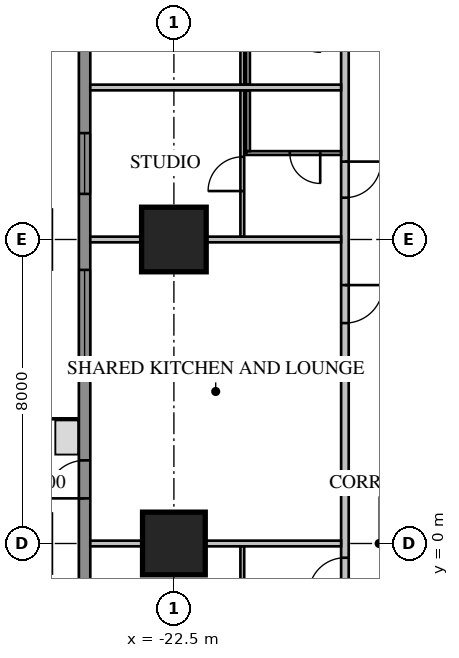
"""IFC4 building model, lengths in metres.
Left out: names, types, materials, properties, quantities, classifications, styles, units other than length and angle.
Written with IfcOpenShell. Run it as: python <this file> out.ifc"""

import sys

from ifc_helpers import new_model, si_unit, direction, frame, frame_2d, origin, origin_2d, place, context, subcontext, project, spatial, rectangle, extrude, element, fill, save


model = new_model("IFC4")
c1 = context("Model", 3, precision=1e-05, world=origin(), true_north=direction((0.0, 1.0)))
c2 = subcontext(c1, "Body", "Model", "MODEL_VIEW")
j1 = project(units=[si_unit("LENGTHUNIT", "METRE"), si_unit("PLANEANGLEUNIT", "RADIAN")], contexts=[c1])
p1 = place(None, origin())
s1 = spatial("IfcSite", under=j1, at=p1, CompositionType="ELEMENT")
p2 = place(p1, origin())
s2 = spatial("IfcBuilding", under=s1, at=p2, CompositionType="ELEMENT")
p3 = place(p2, frame((0.0, 0.0, 42.95)))
s3 = spatial("IfcBuildingStorey", under=s2, at=p3, CompositionType="ELEMENT", Elevation=42.95)
p4 = place(p3, frame((-22.5, 8.0, 0.0), z_axis=(0.0, 0.0, 1.0), x_axis=(1.0, 0.0, 0.0)))
e1 = element("IfcColumn", 1, at=p4, inside=s3, PredefinedType="COLUMN", context=c2, shape_type="SweptSolid", body=[
    extrude(rectangle(XDim=1.7, YDim=1.7, at=origin_2d()), origin(), (0.0, 0.0, 1.0), 3.85),
])
p5 = place(p3, frame((-22.5, 0.0, 0.0), z_axis=(0.0, 0.0, 1.0), x_axis=(1.0, 0.0, 0.0)))
e2 = element("IfcColumn", 2, at=p5, inside=s3, PredefinedType="COLUMN", context=c2, shape_type="SweptSolid", body=[
    extrude(rectangle(XDim=1.65, YDim=1.65, at=origin_2d()), origin(), (0.0, 0.0, 1.0), 3.85),
])
p6 = place(p3, frame((-24.85, 16.0, 0.0), z_axis=(0.0, 0.0, 1.0), x_axis=(0.0, -1.0, 0.0)))
e3 = element("IfcWall", 3, at=p6, inside=s3, PredefinedType="SOLIDWALL", context=c2, shape_type="SweptSolid", body=[
    extrude(rectangle(XDim=32.0, YDim=0.3, at=frame_2d((16.0, 0.0))), origin(), (0.0, 0.0, 1.0), 3.65),
])
p7 = place(p6, frame((1.2, 0.0, 0.75)))
e4 = element("IfcOpeningElement", 4, at=p7, cuts=e3, PredefinedType="OPENING", context=c2, shape_type="SweptSolid", body=[
    extrude(rectangle(XDim=1.6, YDim=1.8, at=frame_2d((0.8, 0.9))), frame((0.0, 0.17, 0.0), z_axis=(0.0, -1.0, 0.0), x_axis=(1.0, 0.0, 0.0)), (0.0, 0.0, 1.0), 0.34),
])
p8 = place(p6, frame((5.2, 0.0, 0.75)))
e5 = element("IfcOpeningElement", 5, at=p8, cuts=e3, PredefinedType="OPENING", context=c2, shape_type="SweptSolid", body=[
    extrude(rectangle(XDim=1.6, YDim=1.8, at=frame_2d((0.8, 0.9))), frame((0.0, 0.17, 0.0), z_axis=(0.0, -1.0, 0.0), x_axis=(1.0, 0.0, 0.0)), (0.0, 0.0, 1.0), 0.34),
])
p9 = place(p6, frame((17.2, 0.0, 0.75)))
e6 = element("IfcOpeningElement", 6, at=p9, cuts=e3, PredefinedType="OPENING", context=c2, shape_type="SweptSolid", body=[
    extrude(rectangle(XDim=1.6, YDim=1.8, at=frame_2d((0.8, 0.9))), frame((0.0, 0.17, 0.0), z_axis=(0.0, -1.0, 0.0), x_axis=(1.0, 0.0, 0.0)), (0.0, 0.0, 1.0), 0.34),
])
p10 = place(p6, frame((21.2, 0.0, 0.75)))
e7 = element("IfcOpeningElement", 7, at=p10, cuts=e3, PredefinedType="OPENING", context=c2, shape_type="SweptSolid", body=[
    extrude(rectangle(XDim=1.6, YDim=1.8, at=frame_2d((0.8, 0.9))), frame((0.0, 0.17, 0.0), z_axis=(0.0, -1.0, 0.0), x_axis=(1.0, 0.0, 0.0)), (0.0, 0.0, 1.0), 0.34),
])
p11 = place(p6, frame((25.2, 0.0, 0.75)))
e8 = element("IfcOpeningElement", 8, at=p11, cuts=e3, PredefinedType="OPENING", context=c2, shape_type="SweptSolid", body=[
    extrude(rectangle(XDim=1.6, YDim=1.8, at=frame_2d((0.8, 0.9))), frame((0.0, 0.17, 0.0), z_axis=(0.0, -1.0, 0.0), x_axis=(1.0, 0.0, 0.0)), (0.0, 0.0, 1.0), 0.34),
])
p12 = place(p6, frame((29.2, 0.0, 0.75)))
e9 = element("IfcOpeningElement", 9, at=p12, cuts=e3, PredefinedType="OPENING", context=c2, shape_type="SweptSolid", body=[
    extrude(rectangle(XDim=1.6, YDim=1.8, at=frame_2d((0.8, 0.9))), frame((0.0, 0.17, 0.0), z_axis=(0.0, -1.0, 0.0), x_axis=(1.0, 0.0, 0.0)), (0.0, 0.0, 1.0), 0.34),
])
p13 = place(p6, frame((8.8, 0.0, 0.75)))
e10 = element("IfcOpeningElement", 10, at=p13, cuts=e3, PredefinedType="OPENING", context=c2, shape_type="SweptSolid", body=[
    extrude(rectangle(XDim=2.4, YDim=1.8, at=frame_2d((1.2, 0.9))), frame((0.0, 0.17, 0.0), z_axis=(0.0, -1.0, 0.0), x_axis=(1.0, 0.0, 0.0)), (0.0, 0.0, 1.0), 0.34),
])
p14 = place(p6, frame((13.812, 0.0, 0.0)))
e11 = element("IfcOpeningElement", 11, at=p14, cuts=e3, PredefinedType="OPENING", context=c2, shape_type="SweptSolid", body=[
    extrude(rectangle(XDim=1.0, YDim=2.4, at=frame_2d((0.5, 1.2))), frame((0.0, 0.17, 0.0), z_axis=(0.0, -1.0, 0.0), x_axis=(1.0, 0.0, 0.0)), (0.0, 0.0, 1.0), 0.34),
])
p15 = place(p3, frame((-18.0, 18.0, 0.0), z_axis=(0.0, 0.0, 1.0), x_axis=(0.0, -1.0, 0.0)))
e12 = element("IfcWall", 12, at=p15, inside=s3, PredefinedType="PARTITIONING", context=c2, shape_type="SweptSolid", body=[
    extrude(rectangle(XDim=36.0, YDim=0.2, at=frame_2d((18.0, 0.0))), origin(), (0.0, 0.0, 1.0), 3.65),
])
p16 = place(p15, frame((0.375, 0.0, 0.0)))
e13 = element("IfcOpeningElement", 13, at=p16, cuts=e12, PredefinedType="OPENING", context=c2, shape_type="SweptSolid", body=[
    extrude(rectangle(XDim=1.0, YDim=2.1, at=frame_2d((0.5, 1.05))), frame((0.0, 0.12, 0.0), z_axis=(0.0, -1.0, 0.0), x_axis=(1.0, 0.0, 0.0)), (0.0, 0.0, 1.0), 0.24),
])
p17 = place(p15, frame((2.375, 0.0, 0.0)))
e14 = element("IfcOpeningElement", 14, at=p17, cuts=e12, PredefinedType="OPENING", context=c2, shape_type="SweptSolid", body=[
    extrude(rectangle(XDim=0.95, YDim=2.1, at=frame_2d((0.475, 1.05))), frame((0.0, 0.12, 0.0), z_axis=(0.0, -1.0, 0.0), x_axis=(1.0, 0.0, 0.0)), (0.0, 0.0, 1.0), 0.24),
])
p18 = place(p15, frame((7.95, 0.0, 0.0)))
e15 = element("IfcOpeningElement", 15, at=p18, cuts=e12, PredefinedType="OPENING", context=c2, shape_type="SweptSolid", body=[
    extrude(rectangle(XDim=0.95, YDim=2.1, at=frame_2d((0.475, 1.05))), frame((0.0, 0.12, 0.0), z_axis=(0.0, -1.0, 0.0), x_axis=(1.0, 0.0, 0.0)), (0.0, 0.0, 1.0), 0.24),
])
p19 = place(p15, frame((18.375, 0.0, 0.0)))
e16 = element("IfcOpeningElement", 16, at=p19, cuts=e12, PredefinedType="OPENING", context=c2, shape_type="SweptSolid", body=[
    extrude(rectangle(XDim=0.95, YDim=2.1, at=frame_2d((0.475, 1.05))), frame((0.0, 0.12, 0.0), z_axis=(0.0, -1.0, 0.0), x_axis=(1.0, 0.0, 0.0)), (0.0, 0.0, 1.0), 0.24),
])
p20 = place(p15, frame((23.95, 0.0, 0.0)))
e17 = element("IfcOpeningElement", 17, at=p20, cuts=e12, PredefinedType="OPENING", context=c2, shape_type="SweptSolid", body=[
    extrude(rectangle(XDim=0.95, YDim=2.1, at=frame_2d((0.475, 1.05))), frame((0.0, 0.12, 0.0), z_axis=(0.0, -1.0, 0.0), x_axis=(1.0, 0.0, 0.0)), (0.0, 0.0, 1.0), 0.24),
])
p21 = place(p15, frame((26.375, 0.0, 0.0)))
e18 = element("IfcOpeningElement", 18, at=p21, cuts=e12, PredefinedType="OPENING", context=c2, shape_type="SweptSolid", body=[
    extrude(rectangle(XDim=0.95, YDim=2.1, at=frame_2d((0.475, 1.05))), frame((0.0, 0.12, 0.0), z_axis=(0.0, -1.0, 0.0), x_axis=(1.0, 0.0, 0.0)), (0.0, 0.0, 1.0), 0.24),
])
p22 = place(p15, frame((31.95, 0.0, 0.0)))
e19 = element("IfcOpeningElement", 19, at=p22, cuts=e12, PredefinedType="OPENING", context=c2, shape_type="SweptSolid", body=[
    extrude(rectangle(XDim=0.95, YDim=2.1, at=frame_2d((0.475, 1.05))), frame((0.0, 0.12, 0.0), z_axis=(0.0, -1.0, 0.0), x_axis=(1.0, 0.0, 0.0)), (0.0, 0.0, 1.0), 0.24),
])
p23 = place(p15, frame((34.375, 0.0, 0.0)))
e20 = element("IfcOpeningElement", 20, at=p23, cuts=e12, PredefinedType="OPENING", context=c2, shape_type="SweptSolid", body=[
    extrude(rectangle(XDim=0.95, YDim=2.1, at=frame_2d((0.475, 1.05))), frame((0.0, 0.12, 0.0), z_axis=(0.0, -1.0, 0.0), x_axis=(1.0, 0.0, 0.0)), (0.0, 0.0, 1.0), 0.24),
])
p24 = place(p15, frame((11.2, 0.0, 0.0)))
e21 = element("IfcOpeningElement", 21, at=p24, cuts=e12, PredefinedType="OPENING", context=c2, shape_type="SweptSolid", body=[
    extrude(rectangle(XDim=1.0, YDim=2.1, at=frame_2d((0.5, 1.05))), frame((0.0, 0.12, 0.0), z_axis=(0.0, -1.0, 0.0), x_axis=(1.0, 0.0, 0.0)), (0.0, 0.0, 1.0), 0.24),
])
for number, where, z_axis, x_axis in (
    (22, (-18.1, 12.0, 0.0), (0.0, 0.0, 1.0), (-1.0, 0.0, 0.0)),
    (23, (-18.1, 8.0, 0.0), (0.0, 0.0, 1.0), (-1.0, 0.0, 0.0)),
):
    element("IfcWall", number, at=place(p3, frame(where, z_axis=z_axis, x_axis=x_axis)), inside=s3, PredefinedType="PARTITIONING", context=c2, shape_type="SweptSolid", body=[
        extrude(rectangle(XDim=6.6, YDim=0.15, at=frame_2d((3.3, 0.0))), origin(), (0.0, 0.0, 1.0), 3.65),
    ])
p25 = place(p3, frame((-18.1, 0.0, 0.0), z_axis=(0.0, 0.0, 1.0), x_axis=(-1.0, 0.0, 0.0)))
e24 = element("IfcWall", 24, at=p25, inside=s3, PredefinedType="PARTITIONING", context=c2, shape_type="SweptSolid", body=[
    extrude(rectangle(XDim=6.6, YDim=0.15, at=frame_2d((3.3, 0.0))), origin(), (0.0, 0.0, 1.0), 2.957),
])
p26 = place(p3, frame((-20.55, 13.675, 0.0), z_axis=(0.0, 0.0, 1.0), x_axis=(0.0, -1.0, 0.0)))
e25 = element("IfcWall", 25, at=p26, inside=s3, PredefinedType="PARTITIONING", context=c2, shape_type="SweptSolid", body=[
    extrude(rectangle(XDim=1.6, YDim=0.1, at=frame_2d((0.8, 0.0))), origin(), (0.0, 0.0, 1.0), 3.65),
])
p27 = place(p3, frame((-18.1, 10.275, 0.0), z_axis=(0.0, 0.0, 1.0), x_axis=(-1.0, 0.0, 0.0)))
e26 = element("IfcWall", 26, at=p27, inside=s3, PredefinedType="PARTITIONING", context=c2, shape_type="SweptSolid", body=[
    extrude(rectangle(XDim=2.5, YDim=0.1, at=frame_2d((1.25, 0.0))), origin(), (0.0, 0.0, 1.0), 3.65),
])
p28 = place(p27, frame((0.55, 0.0, 0.0)))
e27 = element("IfcOpeningElement", 27, at=p28, cuts=e26, PredefinedType="OPENING", context=c2, shape_type="SweptSolid", body=[
    extrude(rectangle(XDim=0.8, YDim=2.1, at=frame_2d((0.4, 1.05))), frame((0.0, 0.07, 0.0), z_axis=(0.0, -1.0, 0.0), x_axis=(1.0, 0.0, 0.0)), (0.0, 0.0, 1.0), 0.14),
])
p29 = place(p3, frame((-20.55, 11.925, 0.0), z_axis=(0.0, 0.0, 1.0), x_axis=(0.0, -1.0, 0.0)))
e28 = element("IfcWall", 28, at=p29, inside=s3, PredefinedType="PARTITIONING", context=c2, shape_type="SweptSolid", body=[
    extrude(rectangle(XDim=1.6, YDim=0.1, at=frame_2d((0.8, 0.0))), origin(), (0.0, 0.0, 1.0), 3.65),
])
p30 = place(p3, frame((-20.7, 15.925, 0.0), z_axis=(0.0, 0.0, 1.0), x_axis=(0.0, -1.0, 0.0)))
e29 = element("IfcWall", 29, at=p30, inside=s3, PredefinedType="PARTITIONING", context=c2, shape_type="SweptSolid", body=[
    extrude(rectangle(XDim=3.85, YDim=0.1, at=frame_2d((1.925, 0.0))), origin(), (0.0, 0.0, 1.0), 3.65),
])
p31 = place(p30, frame((0.95, 0.0, 0.0)))
e30 = element("IfcOpeningElement", 30, at=p31, cuts=e29, PredefinedType="OPENING", context=c2, shape_type="SweptSolid", body=[
    extrude(rectangle(XDim=0.9, YDim=2.1, at=frame_2d((0.45, 1.05))), frame((0.0, 0.07, 0.0), z_axis=(0.0, -1.0, 0.0), x_axis=(1.0, 0.0, 0.0)), (0.0, 0.0, 1.0), 0.14),
])
p32 = place(p3, frame((-20.7, 11.925, 0.0), z_axis=(0.0, 0.0, 1.0), x_axis=(0.0, -1.0, 0.0)))
e31 = element("IfcWall", 31, at=p32, inside=s3, PredefinedType="PARTITIONING", context=c2, shape_type="SweptSolid", body=[
    extrude(rectangle(XDim=3.85, YDim=0.1, at=frame_2d((1.925, 0.0))), origin(), (0.0, 0.0, 1.0), 3.65),
])
p33 = place(p32, frame((1.75, 0.0, 0.0)))
e32 = element("IfcOpeningElement", 32, at=p33, cuts=e31, PredefinedType="OPENING", context=c2, shape_type="SweptSolid", body=[
    extrude(rectangle(XDim=0.9, YDim=2.1, at=frame_2d((0.45, 1.05))), frame((0.0, 0.07, 0.0), z_axis=(0.0, -1.0, 0.0), x_axis=(1.0, 0.0, 0.0)), (0.0, 0.0, 1.0), 0.14),
])
p34 = place(p3, frame((-20.7, -0.075, 0.0), z_axis=(0.0, 0.0, 1.0), x_axis=(0.0, -1.0, 0.0)))
e33 = element("IfcWall", 33, at=p34, inside=s3, PredefinedType="PARTITIONING", context=c2, shape_type="SweptSolid", body=[
    extrude(rectangle(XDim=3.85, YDim=0.1, at=frame_2d((1.925, 0.0))), origin(), (0.0, 0.0, 1.0), 3.65),
])
p35 = place(p34, frame((0.95, 0.0, 0.0)))
e34 = element("IfcOpeningElement", 34, at=p35, cuts=e33, PredefinedType="OPENING", context=c2, shape_type="SweptSolid", body=[
    extrude(rectangle(XDim=0.9, YDim=2.1, at=frame_2d((0.45, 1.05))), frame((0.0, 0.07, 0.0), z_axis=(0.0, -1.0, 0.0), x_axis=(1.0, 0.0, 0.0)), (0.0, 0.0, 1.0), 0.14),
])
p36 = place(p8, origin())
e35 = element("IfcWindow", 35, at=p36, inside=s3, PartitioningType="SINGLE_PANEL", PredefinedType="WINDOW", context=c2, shape_type="SweptSolid", body=[
    extrude(rectangle(XDim=1.6, YDim=1.8, at=frame_2d((0.8, 0.9))), frame((0.0, 0.03, 0.0), z_axis=(0.0, -1.0, 0.0), x_axis=(1.0, 0.0, 0.0)), (0.0, 0.0, 1.0), 0.06),
])
fill(e5, e35)
p37 = place(p13, origin())
e36 = element("IfcWindow", 36, at=p37, inside=s3, PartitioningType="SINGLE_PANEL", PredefinedType="WINDOW", context=c2, shape_type="SweptSolid", body=[
    extrude(rectangle(XDim=2.4, YDim=1.8, at=frame_2d((1.2, 0.9))), frame((0.0, 0.03, 0.0), z_axis=(0.0, -1.0, 0.0), x_axis=(1.0, 0.0, 0.0)), (0.0, 0.0, 1.0), 0.06),
])
fill(e10, e36)
p38 = place(p14, origin())
e37 = element("IfcDoor", 37, at=p38, inside=s3, OperationType="SINGLE_SWING_RIGHT", PredefinedType="DOOR", context=c2, shape_type="SweptSolid", body=[
    extrude(rectangle(XDim=1.0, YDim=2.4, at=frame_2d((0.5, 1.2))), frame((0.0, 0.025, 0.0), z_axis=(0.0, -1.0, 0.0), x_axis=(1.0, 0.0, 0.0)), (0.0, 0.0, 1.0), 0.05),
])
fill(e11, e37)
p39 = place(p18, origin())
e38 = element("IfcDoor", 38, at=p39, inside=s3, OperationType="SINGLE_SWING_LEFT", PredefinedType="DOOR", context=c2, shape_type="SweptSolid", body=[
    extrude(rectangle(XDim=0.95, YDim=2.1, at=frame_2d((0.475, 1.05))), frame((0.0, 0.025, 0.0), z_axis=(0.0, -1.0, 0.0), x_axis=(1.0, 0.0, 0.0)), (0.0, 0.0, 1.0), 0.05),
])
fill(e15, e38)
p40 = place(p28, origin())
e39 = element("IfcDoor", 39, at=p40, inside=s3, OperationType="SINGLE_SWING_LEFT", PredefinedType="DOOR", context=c2, shape_type="SweptSolid", body=[
    extrude(rectangle(XDim=0.8, YDim=2.1, at=frame_2d((0.4, 1.05))), frame((0.0, 0.025, 0.0), z_axis=(0.0, -1.0, 0.0), x_axis=(1.0, 0.0, 0.0)), (0.0, 0.0, 1.0), 0.05),
])
fill(e27, e39)
p41 = place(p19, origin())
e40 = element("IfcDoor", 40, at=p41, inside=s3, OperationType="SINGLE_SWING_RIGHT", PredefinedType="DOOR", context=c2, shape_type="SweptSolid", body=[
    extrude(rectangle(XDim=0.95, YDim=2.1, at=frame_2d((0.475, 1.05))), frame((0.0, 0.025, 0.0), z_axis=(0.0, -1.0, 0.0), x_axis=(1.0, 0.0, 0.0)), (0.0, 0.0, 1.0), 0.05),
])
fill(e16, e40)
p42 = place(p24, origin())
e41 = element("IfcDoor", 41, at=p42, inside=s3, OperationType="SINGLE_SWING_LEFT", PredefinedType="DOOR", context=c2, shape_type="SweptSolid", body=[
    extrude(rectangle(XDim=1.0, YDim=2.1, at=frame_2d((0.5, 1.05))), frame((0.0, 0.025, 0.0), z_axis=(0.0, -1.0, 0.0), x_axis=(1.0, 0.0, 0.0)), (0.0, 0.0, 1.0), 0.05),
])
fill(e21, e41)
p43 = place(p33, origin())
e42 = element("IfcDoor", 42, at=p43, inside=s3, OperationType="SINGLE_SWING_RIGHT", PredefinedType="DOOR", context=c2, shape_type="SweptSolid", body=[
    extrude(rectangle(XDim=0.9, YDim=2.1, at=frame_2d((0.45, 1.05))), frame((0.0, 0.025, 0.0), z_axis=(0.0, -1.0, 0.0), x_axis=(1.0, 0.0, 0.0)), (0.0, 0.0, 1.0), 0.05),
])
fill(e32, e42)
save(model, sys.argv[1])
